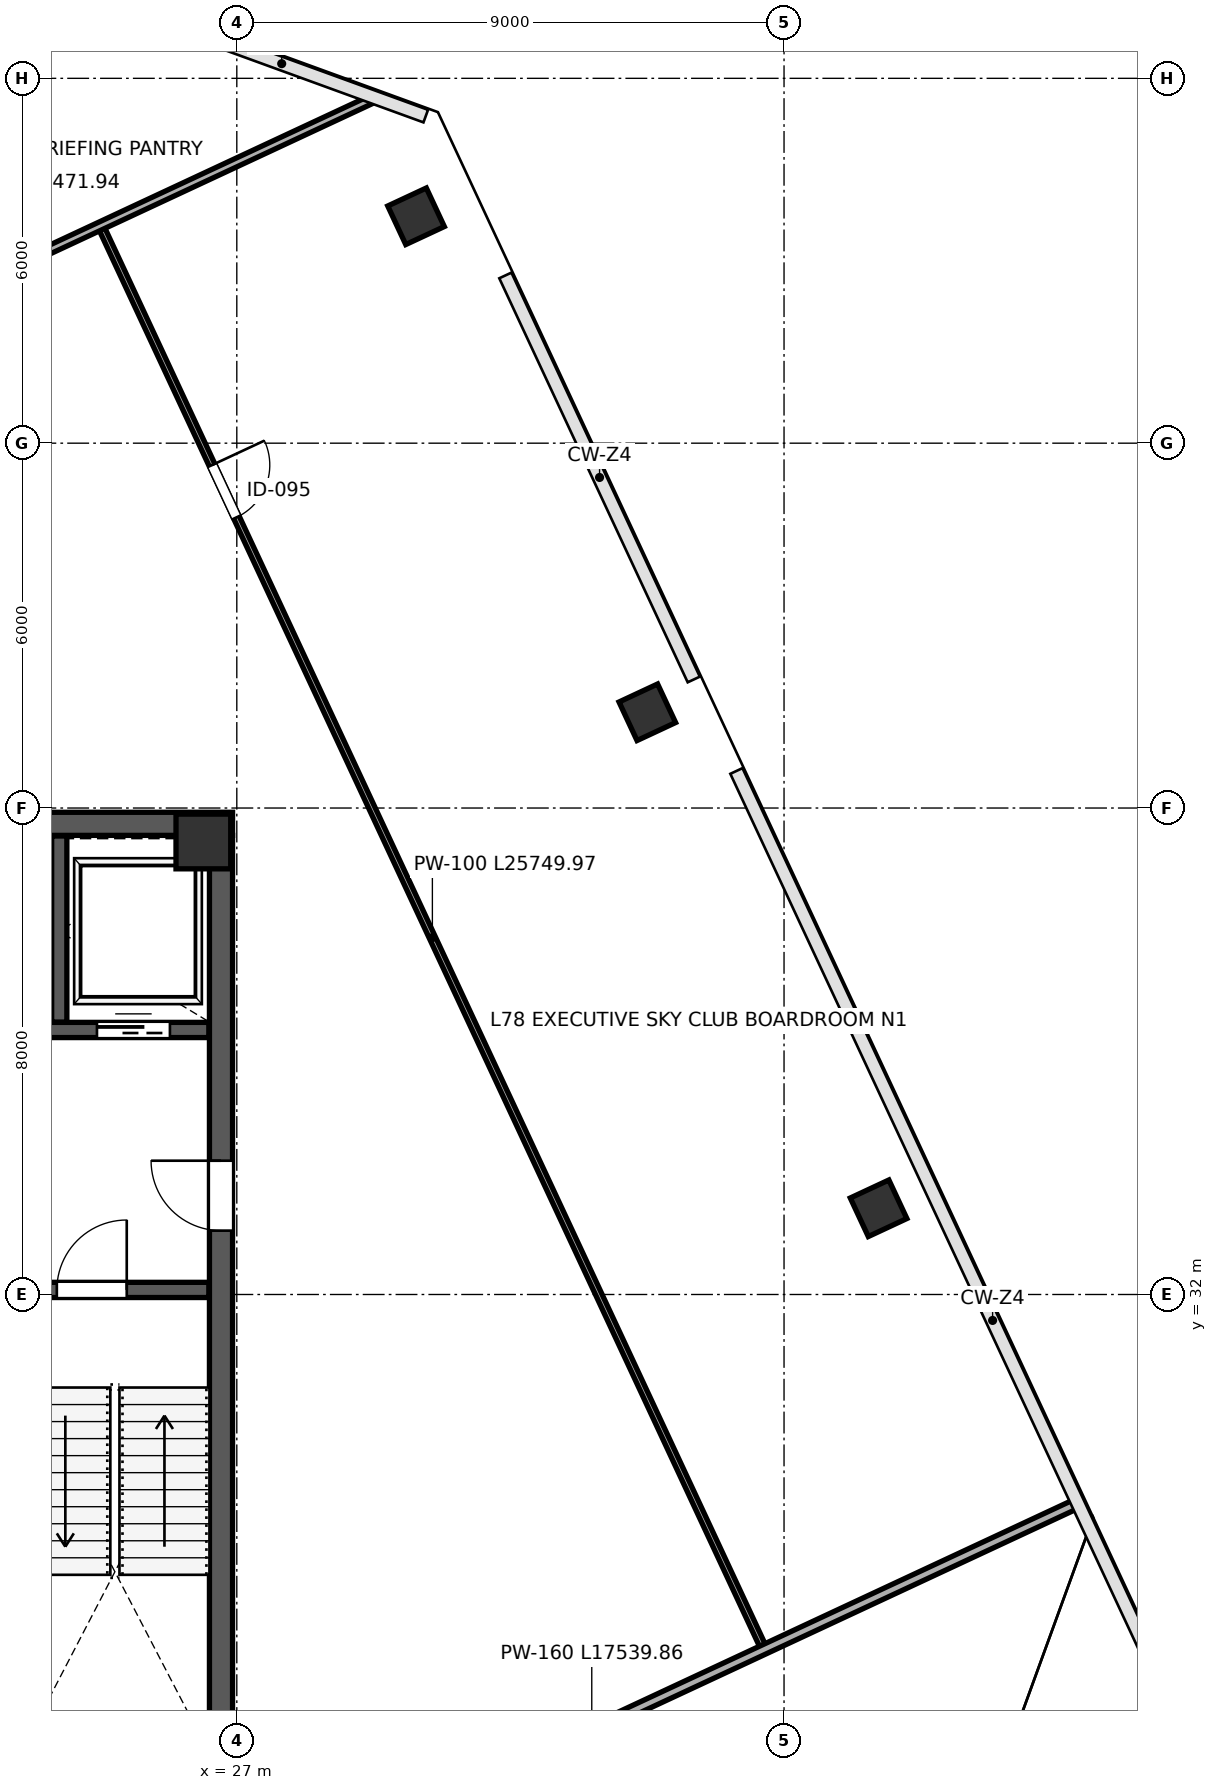
"""IFC4 building model, lengths in metres.
Left out: names, types, materials, properties, quantities, classifications, styles, units other than length and angle.
Written with IfcOpenShell. Run it as: python <this file> out.ifc"""

import sys

from ifc_helpers import new_model, si_unit, direction, frame, frame_2d, origin, origin_2d, place, context, subcontext, project, spatial, rectangle, extrude, clip, halfspace, source, transform, mapped, element, fill, save


model = new_model("IFC4")
c1 = context("Model", 3, precision=1e-05, world=origin(), true_north=direction((0.0, 1.0)))
c2 = subcontext(c1, "Body", "Model", "MODEL_VIEW")
j1 = project(units=[si_unit("LENGTHUNIT", "METRE"), si_unit("PLANEANGLEUNIT", "RADIAN")], contexts=[c1])
p1 = place(None, origin())
s1 = spatial("IfcSite", under=j1, at=p1, CompositionType="ELEMENT")
p2 = place(p1, origin())
s2 = spatial("IfcBuilding", under=s1, at=p2, CompositionType="ELEMENT")
p3 = place(p2, frame((0.0, 0.0, 345.0)))
s3 = spatial("IfcBuildingStorey", under=s2, at=p3, CompositionType="ELEMENT", Elevation=345.0)
m1 = source(origin(), c2, "Body", "SweptSolid", [
    extrude(rectangle(XDim=0.9, YDim=0.9, at=origin_2d()), origin(), (0.0, 0.0, 1.0), 4.198),
])
p4 = place(p3, frame((26.45, 39.45, 0.001), z_axis=(0.0, 0.0, 1.0), x_axis=(1.0, 0.0, 0.0)))
e1 = element("IfcColumn", 1, at=p4, inside=s3, PredefinedType="COLUMN", context=c2, shape_type="MappedRepresentation", body=[
    mapped(m1, transform((0.0, 0.0, 0.0), scale=1.0)),
])
p5 = place(p3, frame((29.948, 49.731, 0.0), z_axis=(0.178557414526, -0.08987674645, 0.979816013426), x_axis=(-0.98321057794, 0.02176204754, 0.181172218384)))
e2 = element("IfcColumn", 2, at=p5, inside=s3, PredefinedType="COLUMN", context=c2, shape_type="Clipping", body=[
    clip(clip(extrude(rectangle(XDim=0.7, YDim=0.7, at=origin_2d()), origin(), (0.0, 0.0, 1.0), 4.286), halfspace(frame((0.0, 0.0, 0.096), z_axis=(0.0, 0.0, -1.0), x_axis=(1.0, 0.0, 0.0)), False)), halfspace(frame((0.0, 0.0, 4.191), z_axis=(0.0, 0.0, 1.0), x_axis=(1.0, 0.0, 0.0)), False)),
])
p6 = place(p3, frame((33.751, 41.575, 0.0), z_axis=(0.095432367806, -0.127740499541, 0.987205666491), x_axis=(-0.874055408456, 0.463835346238, 0.144512679474)))
e3 = element("IfcColumn", 3, at=p6, inside=s3, PredefinedType="COLUMN", context=c2, shape_type="Clipping", body=[
    clip(clip(extrude(rectangle(XDim=0.7, YDim=0.7, at=origin_2d()), origin(), (0.0, 0.0, 1.0), 4.254), halfspace(frame((0.0, 0.0, 0.076), z_axis=(0.0, 0.0, -1.0), x_axis=(1.0, 0.0, 0.0)), False)), halfspace(frame((0.0, 0.0, 4.178), z_axis=(0.0, 0.0, 1.0), x_axis=(1.0, 0.0, 0.0)), False)),
])
p7 = place(p3, frame((37.555, 33.418, 0.0), z_axis=(0.010950287477, -0.164770294282, 0.98627118042), x_axis=(-0.480961717614, 0.863873317213, 0.14966201254)))
e4 = element("IfcColumn", 4, at=p7, inside=s3, PredefinedType="COLUMN", context=c2, shape_type="Clipping", body=[
    clip(clip(extrude(rectangle(XDim=0.7, YDim=0.7, at=origin_2d()), origin(), (0.0, 0.0, 1.0), 4.258), halfspace(frame((0.0, 0.0, 0.079), z_axis=(0.0, 0.0, -1.0), x_axis=(1.0, 0.0, 0.0)), False)), halfspace(frame((0.0, 0.0, 4.18), z_axis=(0.0, 0.0, 1.0), x_axis=(1.0, 0.0, 0.0)), False)),
])
p8 = place(p3, frame((26.74, 24.45, 0.0), z_axis=(0.0, 0.0, 1.0), x_axis=(0.0, 1.0, 0.0)))
e5 = element("IfcWall", 5, at=p8, inside=s3, PredefinedType="SHEAR", context=c2, shape_type="SweptSolid", body=[
    extrude(rectangle(XDim=15.1, YDim=0.38, at=frame_2d((7.55, 0.0))), origin(), (0.0, 0.0, 1.0), 3.92),
])
p9 = place(p8, frame((8.6, 0.0, 0.0)))
e6 = element("IfcOpeningElement", 6, at=p9, cuts=e5, PredefinedType="OPENING", context=c2, shape_type="SweptSolid", body=[
    extrude(rectangle(XDim=1.15, YDim=2.2, at=frame_2d((0.575, 1.1))), frame((0.0, 0.2, 0.0), z_axis=(0.0, -1.0, 0.0), x_axis=(1.0, 0.0, 0.0)), (0.0, 0.0, 1.0), 0.4),
])
p10 = place(p3, frame((9.07, 39.74, 0.0), z_axis=(0.0, 0.0, 1.0), x_axis=(1.0, 0.0, 0.0)))
e7 = element("IfcWall", 7, at=p10, inside=s3, PredefinedType="SHEAR", context=c2, shape_type="SweptSolid", body=[
    extrude(rectangle(XDim=17.86, YDim=0.38, at=frame_2d((8.93, 0.0))), origin(), (0.0, 0.0, 1.0), 3.92),
])
p11 = place(p3, frame((23.19, 32.075, 0.0), z_axis=(0.0, 0.0, 1.0), x_axis=(1.0, 0.0, 0.0)))
e8 = element("IfcWall", 8, at=p11, inside=s3, PredefinedType="SHEAR", context=c2, shape_type="SweptSolid", body=[
    extrude(rectangle(XDim=3.35, YDim=0.25, at=frame_2d((1.675, 0.0))), origin(), (0.0, 0.0, 1.0), 3.92),
])
p12 = place(p11, frame((0.85, 0.0, 0.0)))
e9 = element("IfcOpeningElement", 9, at=p12, cuts=e8, PredefinedType="OPENING", context=c2, shape_type="SweptSolid", body=[
    extrude(rectangle(XDim=1.15, YDim=2.2, at=frame_2d((0.575, 1.1))), frame((0.0, 0.135, 0.0), z_axis=(0.0, -1.0, 0.0), x_axis=(1.0, 0.0, 0.0)), (0.0, 0.0, 1.0), 0.27),
])
p13 = place(p3, frame((21.45, 36.35, 0.0), z_axis=(0.0, 0.0, 1.0), x_axis=(1.0, 0.0, 0.0)))
e10 = element("IfcWall", 10, at=p13, inside=s3, PredefinedType="SHEAR", context=c2, shape_type="SweptSolid", body=[
    extrude(rectangle(XDim=5.09, YDim=0.25, at=frame_2d((2.545, 0.0))), origin(), (0.0, 0.0, 1.0), 3.92),
])
p14 = place(p13, frame((0.7, 0.0, 0.0)))
e11 = element("IfcOpeningElement", 11, at=p14, cuts=e10, PredefinedType="OPENING", context=c2, shape_type="SweptSolid", body=[
    extrude(rectangle(XDim=1.2, YDim=2.2, at=frame_2d((0.6, 1.1))), frame((0.0, 0.135, 0.0), z_axis=(0.0, -1.0, 0.0), x_axis=(1.0, 0.0, 0.0)), (0.0, 0.0, 1.0), 0.27),
])
p15 = place(p13, frame((3.25, 0.0, 0.0)))
e12 = element("IfcOpeningElement", 12, at=p15, cuts=e10, PredefinedType="OPENING", context=c2, shape_type="SweptSolid", body=[
    extrude(rectangle(XDim=1.2, YDim=2.2, at=frame_2d((0.6, 1.1))), frame((0.0, 0.135, 0.0), z_axis=(0.0, -1.0, 0.0), x_axis=(1.0, 0.0, 0.0)), (0.0, 0.0, 1.0), 0.27),
])
p16 = place(p3, frame((24.08, 36.48, 0.0), z_axis=(0.0, 0.0, 1.0), x_axis=(0.0, 1.0, 0.0)))
e13 = element("IfcWall", 13, at=p16, inside=s3, PredefinedType="SHEAR", context=c2, shape_type="SweptSolid", body=[
    extrude(rectangle(XDim=3.06, YDim=0.25, at=frame_2d((1.53, 0.0))), origin(), (0.0, 0.0, 1.0), 3.92),
])
p17 = place(p3, frame((24.775, 49.537, 0.0), z_axis=(0.0, 0.0, 1.0), x_axis=(0.422615543458, -0.906309054588, 0.0)))
e14 = element("IfcWall", 14, at=p17, inside=s3, PredefinedType="PARTITIONING", context=c2, shape_type="SweptSolid", body=[
    extrude(rectangle(XDim=25.75, YDim=0.1, at=frame_2d((12.875, 0.0))), origin(), (0.0, 0.0, 1.0), 3.92),
])
p18 = place(p17, frame((4.3, 0.0, 0.0)))
e15 = element("IfcOpeningElement", 15, at=p18, cuts=e14, PredefinedType="OPENING", context=c2, shape_type="SweptSolid", body=[
    extrude(rectangle(XDim=0.95, YDim=2.15, at=frame_2d((0.475, 1.075))), frame((0.0, 0.06, 0.0), z_axis=(0.0, -1.0, 0.0), x_axis=(1.0, 0.0, 0.0)), (0.0, 0.0, 1.0), 0.12),
])
p19 = place(p3, frame((17.925, 46.387, 0.0), z_axis=(0.0, 0.0, 1.0), x_axis=(0.906304624979, 0.422625042729, 0.0)))
e16 = element("IfcWall", 16, at=p19, inside=s3, PredefinedType="PARTITIONING", context=c2, shape_type="SweptSolid", body=[
    extrude(rectangle(XDim=12.472, YDim=0.135, at=frame_2d((6.236, 0.0))), origin(), (0.0, 0.0, 1.0), 3.212),
])
p20 = place(p3, frame((24.89, 21.135, 0.0), z_axis=(0.0, 0.0, 1.0), x_axis=(0.906308982529, 0.42261569799, 0.0)))
e17 = element("IfcWall", 17, at=p20, inside=s3, PredefinedType="PARTITIONING", context=c2, shape_type="SweptSolid", body=[
    extrude(rectangle(XDim=17.54, YDim=0.16, at=frame_2d((8.77, 0.0))), origin(), (0.0, 0.0, 1.0), 3.92),
])
m2 = source(origin(), c2, "Body", "SweptSolid", [
    extrude(rectangle(XDim=1.15, YDim=2.2, at=frame_2d((0.575, 1.1))), frame((0.0, 0.025, 0.0), z_axis=(0.0, -1.0, 0.0), x_axis=(1.0, 0.0, 0.0)), (0.0, 0.0, 1.0), 0.05),
])
p21 = place(p12, origin())
e18 = element("IfcDoor", 18, at=p21, inside=s3, OperationType="SINGLE_SWING_RIGHT", PredefinedType="DOOR", context=c2, shape_type="MappedRepresentation", body=[
    mapped(m2, transform((0.0, 0.0, 0.0), scale=1.0)),
])
fill(e9, e18)
m3 = source(origin(), c2, "Body", "SweptSolid", [
    extrude(rectangle(XDim=1.15, YDim=2.2, at=frame_2d((0.575, 1.1))), frame((0.0, 0.025, 0.0), z_axis=(0.0, -1.0, 0.0), x_axis=(1.0, 0.0, 0.0)), (0.0, 0.0, 1.0), 0.05),
])
p22 = place(p9, origin())
e19 = element("IfcDoor", 19, at=p22, inside=s3, OperationType="SINGLE_SWING_RIGHT", PredefinedType="DOOR", context=c2, shape_type="MappedRepresentation", body=[
    mapped(m3, transform((0.0, 0.0, 0.0), scale=1.0)),
])
fill(e6, e19)
m4 = source(origin(), c2, "Body", "SweptSolid", [
    extrude(rectangle(XDim=1.2, YDim=2.2, at=frame_2d((0.6, 1.1))), frame((0.0, 0.025, 0.0), z_axis=(0.0, -1.0, 0.0), x_axis=(1.0, 0.0, 0.0)), (0.0, 0.0, 1.0), 0.05),
])
p23 = place(p15, origin())
e20 = element("IfcDoor", 20, at=p23, inside=s3, OperationType="SLIDING_TO_RIGHT", PredefinedType="DOOR", context=c2, shape_type="MappedRepresentation", body=[
    mapped(m4, transform((0.0, 0.0, 0.0), scale=1.0)),
])
fill(e12, e20)
m5 = source(origin(), c2, "Body", "SweptSolid", [
    extrude(rectangle(XDim=0.95, YDim=2.15, at=frame_2d((0.475, 1.075))), frame((0.0, 0.025, 0.0), z_axis=(0.0, -1.0, 0.0), x_axis=(1.0, 0.0, 0.0)), (0.0, 0.0, 1.0), 0.05),
])
p24 = place(p18, origin())
e21 = element("IfcDoor", 21, at=p24, inside=s3, OperationType="SINGLE_SWING_LEFT", PredefinedType="DOOR", context=c2, shape_type="MappedRepresentation", body=[
    mapped(m5, transform((0.0, 0.0, 0.0), scale=1.0)),
])
fill(e15, e21)
save(model, sys.argv[1])
